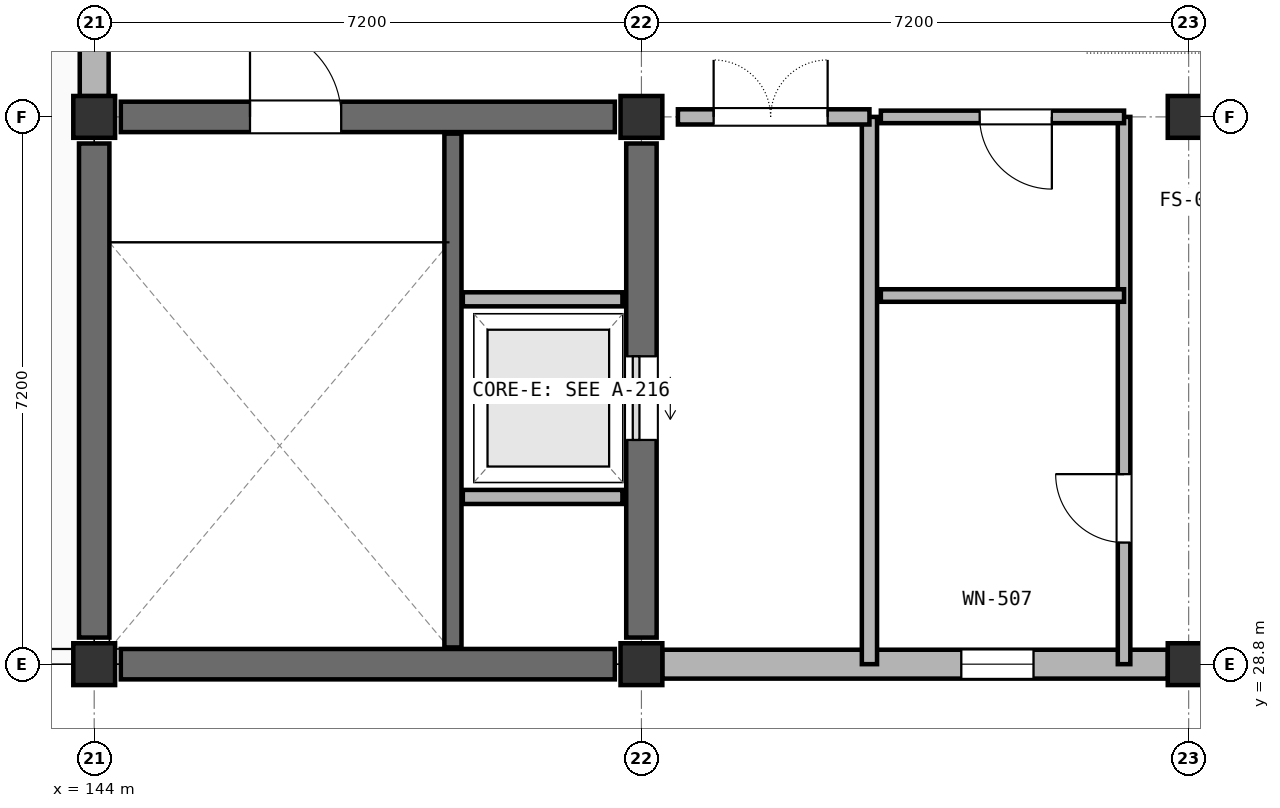
"""IFC4 building model, lengths in metres.
Left out: names, types, materials, properties, quantities, classifications, styles, units other than length and angle.
Written with IfcOpenShell. Run it as: python <this file> out.ifc"""

import sys

from ifc_helpers import new_model, si_unit, direction, frame, frame_2d, origin, origin_2d, place, context, subcontext, project, spatial, rectangle, extrude, element, fill, save


model = new_model("IFC4")
c1 = context("Model", 3, precision=1e-05, world=origin(), true_north=direction((0.0, 1.0)))
c2 = subcontext(c1, "Body", "Model", "MODEL_VIEW")
j1 = project(units=[si_unit("LENGTHUNIT", "METRE"), si_unit("PLANEANGLEUNIT", "RADIAN")], contexts=[c1])
p1 = place(None, origin())
s1 = spatial("IfcSite", under=j1, at=p1, CompositionType="ELEMENT")
p2 = place(p1, origin())
s2 = spatial("IfcBuilding", under=s1, at=p2, CompositionType="ELEMENT")
p3 = place(p2, frame((0.0, 0.0, 14.4)))
s3 = spatial("IfcBuildingStorey", under=s2, at=p3, CompositionType="ELEMENT", Elevation=14.4)
for number, where, z_axis, x_axis in (
    (1, (144.0, 28.8, 0.0), (0.0, 0.0, 1.0), (1.0, 0.0, 0.0)),
    (2, (144.0, 36.0, 0.0), (0.0, 0.0, 1.0), (1.0, 0.0, 0.0)),
    (3, (151.2, 28.8, 0.0), (0.0, 0.0, 1.0), (1.0, 0.0, 0.0)),
    (4, (151.2, 36.0, 0.0), (0.0, 0.0, 1.0), (1.0, 0.0, 0.0)),
    (5, (158.4, 28.8, 0.0), (0.0, 0.0, 1.0), (1.0, 0.0, 0.0)),
    (6, (158.4, 36.0, 0.0), (0.0, 0.0, 1.0), (1.0, 0.0, 0.0)),
):
    element("IfcColumn", number, at=place(p3, frame(where, z_axis=z_axis, x_axis=x_axis)), inside=s3, PredefinedType="COLUMN", context=c2, shape_type="SweptSolid", body=[
        extrude(rectangle(XDim=0.55, YDim=0.55, at=origin_2d()), origin(), (0.0, 0.0, 1.0), 4.2),
    ])
p4 = place(p3, frame((144.35, 28.8, 0.0), z_axis=(0.0, 0.0, 1.0), x_axis=(1.0, 0.0, 0.0)))
e7 = element("IfcWall", 7, at=p4, inside=s3, PredefinedType="SHEAR", context=c2, shape_type="SweptSolid", body=[
    extrude(rectangle(XDim=6.5, YDim=0.4, at=frame_2d((3.25, 0.0))), origin(), (0.0, 0.0, 1.0), 4.2),
])
p5 = place(p3, frame((151.2, 29.15, 0.0), z_axis=(0.0, 0.0, 1.0), x_axis=(0.0, 1.0, 0.0)))
e8 = element("IfcWall", 8, at=p5, inside=s3, PredefinedType="SHEAR", context=c2, shape_type="SweptSolid", body=[
    extrude(rectangle(XDim=6.5, YDim=0.4, at=frame_2d((3.25, 0.0))), origin(), (0.0, 0.0, 1.0), 4.2),
])
p6 = place(p5, frame((2.6, 0.0, 0.0)))
e9 = element("IfcOpeningElement", 9, at=p6, cuts=e8, PredefinedType="OPENING", context=c2, shape_type="SweptSolid", body=[
    extrude(rectangle(XDim=1.1, YDim=2.2, at=frame_2d((0.55, 1.1))), frame((0.0, 0.21, 0.0), z_axis=(0.0, -1.0, 0.0), x_axis=(1.0, 0.0, 0.0)), (0.0, 0.0, 1.0), 0.42),
])
p7 = place(p3, frame((150.85, 36.0, 0.0), z_axis=(0.0, 0.0, 1.0), x_axis=(-1.0, 0.0, 0.0)))
e10 = element("IfcWall", 10, at=p7, inside=s3, PredefinedType="SHEAR", context=c2, shape_type="SweptSolid", body=[
    extrude(rectangle(XDim=6.5, YDim=0.4, at=frame_2d((3.25, 0.0))), origin(), (0.0, 0.0, 1.0), 4.2),
])
p8 = place(p7, frame((3.6, 0.0, 0.0)))
e11 = element("IfcOpeningElement", 11, at=p8, cuts=e10, PredefinedType="OPENING", context=c2, shape_type="SweptSolid", body=[
    extrude(rectangle(XDim=1.2, YDim=2.2, at=frame_2d((0.6, 1.1))), frame((0.0, 0.21, 0.0), z_axis=(0.0, -1.0, 0.0), x_axis=(1.0, 0.0, 0.0)), (0.0, 0.0, 1.0), 0.42),
])
p9 = place(p3, frame((144.0, 35.65, 0.0), z_axis=(0.0, 0.0, 1.0), x_axis=(0.0, -1.0, 0.0)))
e12 = element("IfcWall", 12, at=p9, inside=s3, PredefinedType="SHEAR", context=c2, shape_type="SweptSolid", body=[
    extrude(rectangle(XDim=6.5, YDim=0.4, at=frame_2d((3.25, 0.0))), origin(), (0.0, 0.0, 1.0), 4.2),
])
p10 = place(p3, frame((148.72, 29.02, 0.0), z_axis=(0.0, 0.0, 1.0), x_axis=(0.0, 1.0, 0.0)))
e13 = element("IfcWall", 13, at=p10, inside=s3, PredefinedType="SHEAR", context=c2, shape_type="SweptSolid", body=[
    extrude(rectangle(XDim=6.76, YDim=0.225, at=frame_2d((3.38, 0.0))), origin(), (0.0, 0.0, 1.0), 4.2),
])
for number, where, z_axis, x_axis in (
    (14, (148.85, 31.0, 0.0), (0.0, 0.0, 1.0), (1.0, 0.0, 0.0)),
    (15, (148.85, 33.6, 0.0), (0.0, 0.0, 1.0), (1.0, 0.0, 0.0)),
):
    element("IfcWall", number, at=place(p3, frame(where, z_axis=z_axis, x_axis=x_axis)), inside=s3, PredefinedType="PARTITIONING", context=c2, shape_type="SweptSolid", body=[
        extrude(rectangle(XDim=2.1, YDim=0.185, at=frame_2d((1.05, 0.0))), origin(), (0.0, 0.0, 1.0), 4.2),
    ])
p11 = place(p3, frame((144.0, 36.273, 0.0), z_axis=(0.0, 0.0, 1.0), x_axis=(0.0, 1.0, 0.0)))
e16 = element("IfcWall", 16, at=p11, inside=s3, PredefinedType="SOLIDWALL", context=c2, shape_type="SweptSolid", body=[
    extrude(rectangle(XDim=6.654, YDim=0.38, at=frame_2d((3.327, 0.0))), origin(), (0.0, 0.0, 1.0), 3.04),
])
p12 = place(p11, frame((2.827, 0.0, 0.7)))
e17 = element("IfcOpeningElement", 17, at=p12, cuts=e16, PredefinedType="OPENING", context=c2, shape_type="SweptSolid", body=[
    extrude(rectangle(XDim=1.0, YDim=2.0, at=frame_2d((0.5, 1.0))), frame((0.0, 0.2, 0.0), z_axis=(0.0, -1.0, 0.0), x_axis=(1.0, 0.0, 0.0)), (0.0, 0.0, 1.0), 0.4),
])
p13 = place(p3, frame((151.473, 28.8, 0.0), z_axis=(0.0, 0.0, 1.0), x_axis=(1.0, 0.0, 0.0)))
e18 = element("IfcWall", 18, at=p13, inside=s3, PredefinedType="SOLIDWALL", context=c2, shape_type="SweptSolid", body=[
    extrude(rectangle(XDim=6.654, YDim=0.38, at=frame_2d((3.327, 0.0))), origin(), (0.0, 0.0, 1.0), 3.04),
])
p14 = place(p13, frame((3.936, 0.0, 0.7)))
e19 = element("IfcOpeningElement", 19, at=p14, cuts=e18, PredefinedType="OPENING", context=c2, shape_type="SweptSolid", body=[
    extrude(rectangle(XDim=0.95, YDim=2.15, at=frame_2d((0.475, 1.075))), frame((0.0, 0.2, 0.0), z_axis=(0.0, -1.0, 0.0), x_axis=(1.0, 0.0, 0.0)), (0.0, 0.0, 1.0), 0.4),
])
p15 = place(p3, frame((154.2, 28.8, 0.0), z_axis=(0.0, 0.0, 1.0), x_axis=(0.0, 1.0, 0.0)))
e20 = element("IfcWall", 20, at=p15, inside=s3, PredefinedType="PARTITIONING", context=c2, shape_type="SweptSolid", body=[
    extrude(rectangle(XDim=7.2, YDim=0.2, at=frame_2d((3.6, 0.0))), origin(), (0.0, 0.0, 1.0), 3.08),
])
p16 = place(p3, frame((154.2, 36.0, 0.0), z_axis=(0.0, 0.0, 1.0), x_axis=(-1.0, 0.0, 0.0)))
e21 = element("IfcWall", 21, at=p16, inside=s3, PredefinedType="PARTITIONING", context=c2, shape_type="SweptSolid", body=[
    extrude(rectangle(XDim=2.52, YDim=0.2, at=frame_2d((1.26, 0.0))), origin(), (0.0, 0.0, 1.0), 3.08),
])
p17 = place(p16, frame((0.55, 0.0, 0.0)))
e22 = element("IfcOpeningElement", 22, at=p17, cuts=e21, PredefinedType="OPENING", context=c2, shape_type="SweptSolid", body=[
    extrude(rectangle(XDim=1.5, YDim=2.2, at=frame_2d((0.75, 1.1))), frame((0.0, 0.11, 0.0), z_axis=(0.0, -1.0, 0.0), x_axis=(1.0, 0.0, 0.0)), (0.0, 0.0, 1.0), 0.22),
])
p18 = place(p3, frame((157.55, 28.8, 0.0), z_axis=(0.0, 0.0, 1.0), x_axis=(0.0, 1.0, 0.0)))
e23 = element("IfcWall", 23, at=p18, inside=s3, PredefinedType="PARTITIONING", context=c2, shape_type="SweptSolid", body=[
    extrude(rectangle(XDim=7.2, YDim=0.165, at=frame_2d((3.6, 0.0))), origin(), (0.0, 0.0, 1.0), 3.08),
])
p19 = place(p18, frame((1.6, 0.0, 0.0)))
e24 = element("IfcOpeningElement", 24, at=p19, cuts=e23, PredefinedType="OPENING", context=c2, shape_type="SweptSolid", body=[
    extrude(rectangle(XDim=0.9, YDim=2.15, at=frame_2d((0.45, 1.075))), frame((0.0, 0.093, 0.0), z_axis=(0.0, -1.0, 0.0), x_axis=(1.0, 0.0, 0.0)), (0.0, 0.0, 1.0), 0.185),
])
p20 = place(p3, frame((157.55, 36.0, 0.0), z_axis=(0.0, 0.0, 1.0), x_axis=(-1.0, 0.0, 0.0)))
e25 = element("IfcWall", 25, at=p20, inside=s3, PredefinedType="PARTITIONING", context=c2, shape_type="SweptSolid", body=[
    extrude(rectangle(XDim=3.2, YDim=0.165, at=frame_2d((1.6, 0.0))), origin(), (0.0, 0.0, 1.0), 3.08),
])
p21 = place(p20, frame((0.95, 0.0, 0.0)))
e26 = element("IfcOpeningElement", 26, at=p21, cuts=e25, PredefinedType="OPENING", context=c2, shape_type="SweptSolid", body=[
    extrude(rectangle(XDim=0.95, YDim=2.15, at=frame_2d((0.475, 1.075))), frame((0.0, 0.093, 0.0), z_axis=(0.0, -1.0, 0.0), x_axis=(1.0, 0.0, 0.0)), (0.0, 0.0, 1.0), 0.185),
])
p22 = place(p3, frame((154.35, 33.65, 0.0), z_axis=(0.0, 0.0, 1.0), x_axis=(1.0, 0.0, 0.0)))
e27 = element("IfcWall", 27, at=p22, inside=s3, PredefinedType="PARTITIONING", context=c2, shape_type="SweptSolid", body=[
    extrude(rectangle(XDim=3.2, YDim=0.165, at=frame_2d((1.6, 0.0))), origin(), (0.0, 0.0, 1.0), 3.08),
])
p23 = place(p6, origin())
e28 = element("IfcDoor", 28, at=p23, inside=s3, OperationType="SLIDING_TO_LEFT", PredefinedType="DOOR", context=c2, shape_type="SweptSolid", body=[
    extrude(rectangle(XDim=1.1, YDim=2.2, at=frame_2d((0.55, 1.1))), frame((0.0, 0.025, 0.0), z_axis=(0.0, -1.0, 0.0), x_axis=(1.0, 0.0, 0.0)), (0.0, 0.0, 1.0), 0.05),
])
fill(e9, e28)
p24 = place(p14, origin())
e29 = element("IfcWindow", 29, at=p24, inside=s3, PartitioningType="SINGLE_PANEL", PredefinedType="WINDOW", context=c2, shape_type="SweptSolid", body=[
    extrude(rectangle(XDim=0.95, YDim=2.15, at=frame_2d((0.475, 1.075))), frame((0.0, 0.03, 0.0), z_axis=(0.0, -1.0, 0.0), x_axis=(1.0, 0.0, 0.0)), (0.0, 0.0, 1.0), 0.06),
])
fill(e19, e29)
p25 = place(p8, frame((1.2, 0.0, 0.0), z_axis=(0.0, 0.0, 1.0), x_axis=(-1.0, 0.0, 0.0)))
e30 = element("IfcDoor", 30, at=p25, inside=s3, OperationType="SINGLE_SWING_LEFT", PredefinedType="DOOR", context=c2, shape_type="SweptSolid", body=[
    extrude(rectangle(XDim=1.2, YDim=2.2, at=frame_2d((0.6, 1.1))), frame((0.0, 0.025, 0.0), z_axis=(0.0, -1.0, 0.0), x_axis=(1.0, 0.0, 0.0)), (0.0, 0.0, 1.0), 0.05),
])
fill(e11, e30)
p26 = place(p17, frame((1.5, 0.0, 0.0), z_axis=(0.0, 0.0, 1.0), x_axis=(-1.0, 0.0, 0.0)))
e31 = element("IfcDoor", 31, at=p26, inside=s3, OperationType="DOUBLE_DOOR_SINGLE_SWING", PredefinedType="DOOR", context=c2, shape_type="SweptSolid", body=[
    extrude(rectangle(XDim=1.5, YDim=2.2, at=frame_2d((0.75, 1.1))), frame((0.0, 0.025, 0.0), z_axis=(0.0, -1.0, 0.0), x_axis=(1.0, 0.0, 0.0)), (0.0, 0.0, 1.0), 0.05),
])
fill(e22, e31)
p27 = place(p19, origin())
e32 = element("IfcDoor", 32, at=p27, inside=s3, OperationType="SINGLE_SWING_RIGHT", PredefinedType="DOOR", context=c2, shape_type="SweptSolid", body=[
    extrude(rectangle(XDim=0.9, YDim=2.15, at=frame_2d((0.45, 1.075))), frame((0.0, 0.025, 0.0), z_axis=(0.0, -1.0, 0.0), x_axis=(1.0, 0.0, 0.0)), (0.0, 0.0, 1.0), 0.05),
])
fill(e24, e32)
p28 = place(p21, origin())
e33 = element("IfcDoor", 33, at=p28, inside=s3, OperationType="SINGLE_SWING_LEFT", PredefinedType="DOOR", context=c2, shape_type="SweptSolid", body=[
    extrude(rectangle(XDim=0.95, YDim=2.15, at=frame_2d((0.475, 1.075))), frame((0.0, 0.025, 0.0), z_axis=(0.0, -1.0, 0.0), x_axis=(1.0, 0.0, 0.0)), (0.0, 0.0, 1.0), 0.05),
])
fill(e26, e33)
save(model, sys.argv[1])
